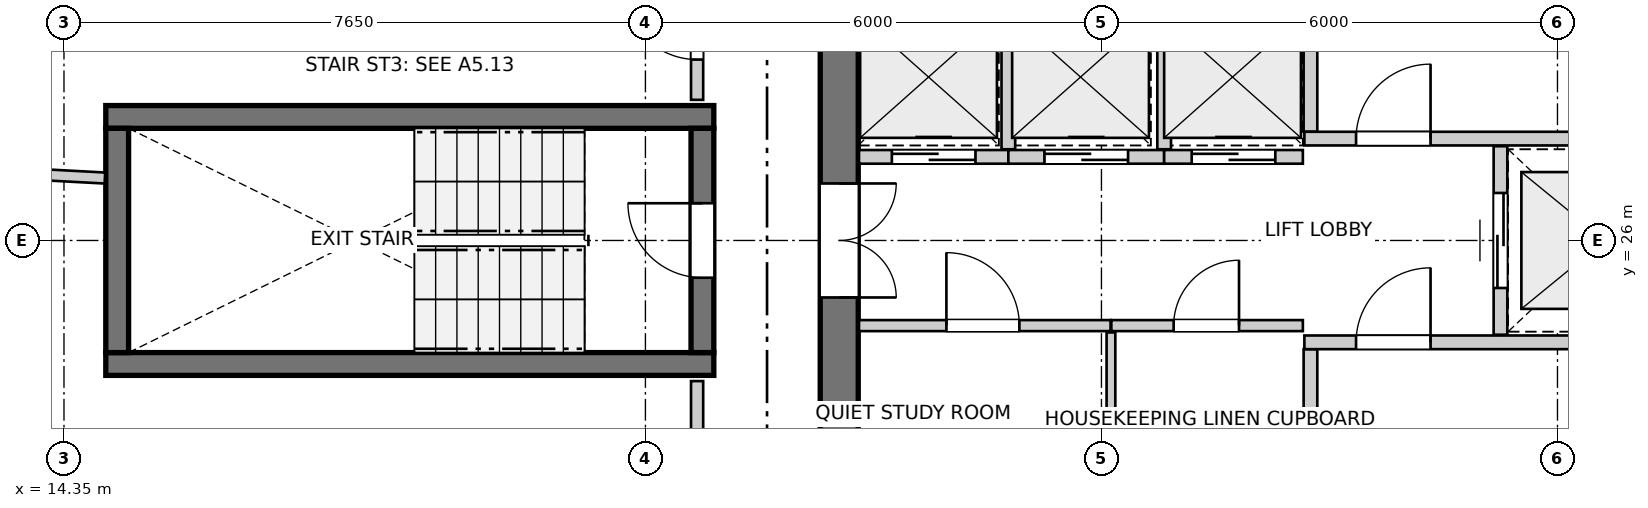
"""IFC4 building model, lengths in metres.
Left out: names, types, materials, properties, quantities, classifications, styles, units other than length and angle.
Written with IfcOpenShell. Run it as: python <this file> out.ifc"""

import sys

from ifc_helpers import new_model, si_unit, direction, frame, frame_2d, origin, place, context, subcontext, project, spatial, rectangle, extrude, source, transform, mapped, element, fill, save


model = new_model("IFC4")
c1 = context("Model", 3, precision=1e-05, world=origin(), true_north=direction((0.0, 1.0)))
c2 = subcontext(c1, "Body", "Model", "MODEL_VIEW")
j1 = project(units=[si_unit("LENGTHUNIT", "METRE"), si_unit("PLANEANGLEUNIT", "RADIAN")], contexts=[c1])
p1 = place(None, origin())
s1 = spatial("IfcSite", under=j1, at=p1, CompositionType="ELEMENT")
p2 = place(p1, origin())
s2 = spatial("IfcBuilding", under=s1, at=p2, CompositionType="ELEMENT")
p3 = place(p2, frame((0.0, 0.0, 211.6)))
s3 = spatial("IfcBuildingStorey", under=s2, at=p3, CompositionType="ELEMENT", Elevation=211.6)
p4 = place(p3, frame((24.55, 33.8, 0.0), z_axis=(0.0, 0.0, 1.0), x_axis=(0.0, -1.0, 0.0)))
e1 = element("IfcWall", 1, at=p4, inside=s3, PredefinedType="SHEAR", context=c2, shape_type="SweptSolid", body=[
    extrude(rectangle(XDim=15.6, YDim=0.5, at=frame_2d((7.8, 0.0))), origin(), (0.0, 0.0, 1.0), 2.96),
])
p5 = place(p4, frame((7.05, 0.0, 0.0)))
e2 = element("IfcOpeningElement", 2, at=p5, cuts=e1, PredefinedType="OPENING", context=c2, shape_type="SweptSolid", body=[
    extrude(rectangle(XDim=1.5, YDim=2.15, at=frame_2d((0.75, 1.075))), frame((0.0, 0.26, 0.0), z_axis=(0.0, -1.0, 0.0), x_axis=(1.0, 0.0, 0.0)), (0.0, 0.0, 1.0), 0.52),
])
p6 = place(p4, frame((3.52, 0.0, 0.0)))
e3 = element("IfcOpeningElement", 3, at=p6, cuts=e1, PredefinedType="OPENING", context=c2, shape_type="SweptSolid", body=[
    extrude(rectangle(XDim=0.86, YDim=2.05, at=frame_2d((0.43, 1.025))), frame((0.0, 0.26, 0.0), z_axis=(0.0, -1.0, 0.0), x_axis=(1.0, 0.0, 0.0)), (0.0, 0.0, 1.0), 0.52),
])
p7 = place(p4, frame((11.22, 0.0, 0.0)))
e4 = element("IfcOpeningElement", 4, at=p7, cuts=e1, PredefinedType="OPENING", context=c2, shape_type="SweptSolid", body=[
    extrude(rectangle(XDim=0.86, YDim=2.05, at=frame_2d((0.43, 1.025))), frame((0.0, 0.26, 0.0), z_axis=(0.0, -1.0, 0.0), x_axis=(1.0, 0.0, 0.0)), (0.0, 0.0, 1.0), 0.52),
])
for number, where, z_axis, x_axis in (
    (5, (14.9, 24.375, 0.0), (0.0, 0.0, 1.0), (1.0, 0.0, 0.0)),
    (6, (22.9, 27.625, 0.0), (0.0, 0.0, 1.0), (-1.0, 0.0, 0.0)),
):
    element("IfcWall", number, at=place(p3, frame(where, z_axis=z_axis, x_axis=x_axis)), inside=s3, PredefinedType="SHEAR", context=c2, shape_type="SweptSolid", body=[
        extrude(rectangle(XDim=8.0, YDim=0.3, at=frame_2d((4.0, 0.0))), origin(), (0.0, 0.0, 1.0), 2.96),
    ])
p8 = place(p3, frame((15.05, 27.475, 0.0), z_axis=(0.0, 0.0, 1.0), x_axis=(0.0, -1.0, 0.0)))
e7 = element("IfcWall", 7, at=p8, inside=s3, PredefinedType="SHEAR", context=c2, shape_type="SweptSolid", body=[
    extrude(rectangle(XDim=2.95, YDim=0.3, at=frame_2d((1.475, 0.0))), origin(), (0.0, 0.0, 1.0), 2.96),
])
p9 = place(p3, frame((22.75, 24.525, 0.0), z_axis=(0.0, 0.0, 1.0), x_axis=(0.0, 1.0, 0.0)))
e8 = element("IfcWall", 8, at=p9, inside=s3, PredefinedType="SHEAR", context=c2, shape_type="SweptSolid", body=[
    extrude(rectangle(XDim=2.95, YDim=0.3, at=frame_2d((1.475, 0.0))), origin(), (0.0, 0.0, 1.0), 2.96),
])
p10 = place(p9, frame((0.985, 0.0, 0.0)))
e9 = element("IfcOpeningElement", 9, at=p10, cuts=e8, PredefinedType="OPENING", context=c2, shape_type="SweptSolid", body=[
    extrude(rectangle(XDim=0.98, YDim=2.15, at=frame_2d((0.49, 1.075))), frame((0.0, 0.16, 0.0), z_axis=(0.0, -1.0, 0.0), x_axis=(1.0, 0.0, 0.0)), (0.0, 0.0, 1.0), 0.32),
])
p11 = place(p3, frame((30.75, 21.46, 0.0), z_axis=(0.0, 0.0, 1.0), x_axis=(0.0, 1.0, 0.0)))
e10 = element("IfcWall", 10, at=p11, inside=s3, PredefinedType="PARTITIONING", context=c2, shape_type="SweptSolid", body=[
    extrude(rectangle(XDim=3.11, YDim=0.18, at=frame_2d((1.555, 0.0))), origin(), (0.0, 0.0, 1.0), 2.96),
])
p12 = place(p11, frame((0.26, 0.0, 0.0)))
e11 = element("IfcOpeningElement", 11, at=p12, cuts=e10, PredefinedType="OPENING", context=c2, shape_type="SweptSolid", body=[
    extrude(rectangle(XDim=0.86, YDim=2.05, at=frame_2d((0.43, 1.025))), frame((0.0, 0.1, 0.0), z_axis=(0.0, -1.0, 0.0), x_axis=(1.0, 0.0, 0.0)), (0.0, 0.0, 1.0), 0.2),
])
p13 = place(p3, frame((30.67, 24.66, 0.0), z_axis=(0.0, 0.0, 1.0), x_axis=(1.0, 0.0, 0.0)))
e12 = element("IfcWall", 12, at=p13, inside=s3, PredefinedType="PARTITIONING", context=c2, shape_type="SweptSolid", body=[
    extrude(rectangle(XDim=5.22, YDim=0.18, at=frame_2d((2.61, 0.0))), origin(), (0.0, 0.0, 1.0), 2.96),
])
p14 = place(p13, frame((0.68, 0.0, 0.0)))
e13 = element("IfcOpeningElement", 13, at=p14, cuts=e12, PredefinedType="OPENING", context=c2, shape_type="SweptSolid", body=[
    extrude(rectangle(XDim=0.98, YDim=2.15, at=frame_2d((0.49, 1.075))), frame((0.0, 0.1, 0.0), z_axis=(0.0, -1.0, 0.0), x_axis=(1.0, 0.0, 0.0)), (0.0, 0.0, 1.0), 0.2),
])
p15 = place(p3, frame((30.75, 27.43, 0.0), z_axis=(0.0, 0.0, 1.0), x_axis=(0.0, 1.0, 0.0)))
e14 = element("IfcWall", 14, at=p15, inside=s3, PredefinedType="PARTITIONING", context=c2, shape_type="SweptSolid", body=[
    extrude(rectangle(XDim=3.11, YDim=0.18, at=frame_2d((1.555, 0.0))), origin(), (0.0, 0.0, 1.0), 2.96),
])
p16 = place(p15, frame((1.98, 0.0, 0.0)))
e15 = element("IfcOpeningElement", 15, at=p16, cuts=e14, PredefinedType="OPENING", context=c2, shape_type="SweptSolid", body=[
    extrude(rectangle(XDim=0.86, YDim=2.05, at=frame_2d((0.43, 1.025))), frame((0.0, 0.1, 0.0), z_axis=(0.0, -1.0, 0.0), x_axis=(1.0, 0.0, 0.0)), (0.0, 0.0, 1.0), 0.2),
])
p17 = place(p3, frame((30.67, 27.34, 0.0), z_axis=(0.0, 0.0, 1.0), x_axis=(1.0, 0.0, 0.0)))
e16 = element("IfcWall", 16, at=p17, inside=s3, PredefinedType="PARTITIONING", context=c2, shape_type="SweptSolid", body=[
    extrude(rectangle(XDim=5.22, YDim=0.18, at=frame_2d((2.61, 0.0))), origin(), (0.0, 0.0, 1.0), 2.96),
])
p18 = place(p17, frame((0.68, 0.0, 0.0)))
e17 = element("IfcOpeningElement", 17, at=p18, cuts=e16, PredefinedType="OPENING", context=c2, shape_type="SweptSolid", body=[
    extrude(rectangle(XDim=0.98, YDim=2.15, at=frame_2d((0.49, 1.075))), frame((0.0, 0.1, 0.0), z_axis=(0.0, -1.0, 0.0), x_axis=(1.0, 0.0, 0.0)), (0.0, 0.0, 1.0), 0.2),
])
p19 = place(p3, frame((33.25, 24.76, 0.0), z_axis=(0.0, 0.0, 1.0), x_axis=(0.0, 1.0, 0.0)))
e18 = element("IfcWall", 18, at=p19, inside=s3, PredefinedType="PARTITIONING", context=c2, shape_type="SweptSolid", body=[
    extrude(rectangle(XDim=2.48, YDim=0.18, at=frame_2d((1.24, 0.0))), origin(), (0.0, 0.0, 1.0), 2.96),
])
p20 = place(p19, frame((0.615, 0.0, 0.0)))
e19 = element("IfcOpeningElement", 19, at=p20, cuts=e18, PredefinedType="OPENING", context=c2, shape_type="SweptSolid", body=[
    extrude(rectangle(XDim=1.25, YDim=2.15, at=frame_2d((0.625, 1.075))), frame((0.0, 0.1, 0.0), z_axis=(0.0, -1.0, 0.0), x_axis=(1.0, 0.0, 0.0)), (0.0, 0.0, 1.0), 0.2),
])
p21 = place(p3, frame((24.81, 24.88, 0.0), z_axis=(0.0, 0.0, 1.0), x_axis=(1.0, 0.0, 0.0)))
e20 = element("IfcWall", 20, at=p21, inside=s3, PredefinedType="PARTITIONING", context=c2, shape_type="SweptSolid", body=[
    extrude(rectangle(XDim=3.31, YDim=0.145, at=frame_2d((1.655, 0.0))), origin(), (0.0, 0.0, 1.0), 2.96),
])
p22 = place(p21, frame((1.15, 0.0, 0.0)))
e21 = element("IfcOpeningElement", 21, at=p22, cuts=e20, PredefinedType="OPENING", context=c2, shape_type="SweptSolid", body=[
    extrude(rectangle(XDim=0.96, YDim=2.1, at=frame_2d((0.48, 1.05))), frame((0.0, 0.083, 0.0), z_axis=(0.0, -1.0, 0.0), x_axis=(1.0, 0.0, 0.0)), (0.0, 0.0, 1.0), 0.165),
])
p23 = place(p3, frame((28.13, 24.88, 0.0), z_axis=(0.0, 0.0, 1.0), x_axis=(1.0, 0.0, 0.0)))
e22 = element("IfcWall", 22, at=p23, inside=s3, PredefinedType="PARTITIONING", context=c2, shape_type="SweptSolid", body=[
    extrude(rectangle(XDim=2.52, YDim=0.145, at=frame_2d((1.26, 0.0))), origin(), (0.0, 0.0, 1.0), 2.96),
])
p24 = place(p23, frame((0.82, 0.0, 0.0)))
e23 = element("IfcOpeningElement", 23, at=p24, cuts=e22, PredefinedType="OPENING", context=c2, shape_type="SweptSolid", body=[
    extrude(rectangle(XDim=0.86, YDim=2.05, at=frame_2d((0.43, 1.025))), frame((0.0, 0.083, 0.0), z_axis=(0.0, -1.0, 0.0), x_axis=(1.0, 0.0, 0.0)), (0.0, 0.0, 1.0), 0.165),
])
p25 = place(p3, frame((28.125, 23.02, 0.0), z_axis=(0.0, 0.0, 1.0), x_axis=(0.0, 1.0, 0.0)))
e24 = element("IfcWall", 24, at=p25, inside=s3, PredefinedType="PARTITIONING", context=c2, shape_type="SweptSolid", body=[
    extrude(rectangle(XDim=1.77, YDim=0.115, at=frame_2d((0.885, 0.0))), origin(), (0.0, 0.0, 1.0), 2.96),
])
p26 = place(p3, frame((24.81, 27.1, 0.0), z_axis=(0.0, 0.0, 1.0), x_axis=(1.0, 0.0, 0.0)))
e25 = element("IfcWall", 25, at=p26, inside=s3, PredefinedType="PARTITIONING", context=c2, shape_type="SweptSolid", body=[
    extrude(rectangle(XDim=1.965, YDim=0.18, at=frame_2d((0.982, 0.0))), origin(), (0.0, 0.0, 1.0), 2.96),
])
p27 = place(p26, frame((0.433, 0.0, 0.0)))
e26 = element("IfcOpeningElement", 26, at=p27, cuts=e25, PredefinedType="OPENING", context=c2, shape_type="SweptSolid", body=[
    extrude(rectangle(XDim=1.1, YDim=2.15, at=frame_2d((0.55, 1.075))), frame((0.0, 0.1, 0.0), z_axis=(0.0, -1.0, 0.0), x_axis=(1.0, 0.0, 0.0)), (0.0, 0.0, 1.0), 0.2),
])
p28 = place(p3, frame((26.775, 27.1, 0.0), z_axis=(0.0, 0.0, 1.0), x_axis=(1.0, 0.0, 0.0)))
e27 = element("IfcWall", 27, at=p28, inside=s3, PredefinedType="PARTITIONING", context=c2, shape_type="SweptSolid", body=[
    extrude(rectangle(XDim=2.05, YDim=0.18, at=frame_2d((1.025, 0.0))), origin(), (0.0, 0.0, 1.0), 2.96),
])
p29 = place(p28, frame((0.475, 0.0, 0.0)))
e28 = element("IfcOpeningElement", 28, at=p29, cuts=e27, PredefinedType="OPENING", context=c2, shape_type="SweptSolid", body=[
    extrude(rectangle(XDim=1.1, YDim=2.15, at=frame_2d((0.55, 1.075))), frame((0.0, 0.1, 0.0), z_axis=(0.0, -1.0, 0.0), x_axis=(1.0, 0.0, 0.0)), (0.0, 0.0, 1.0), 0.2),
])
p30 = place(p3, frame((26.775, 27.2, 0.0), z_axis=(0.0, 0.0, 1.0), x_axis=(0.0, 1.0, 0.0)))
e29 = element("IfcWall", 29, at=p30, inside=s3, PredefinedType="PARTITIONING", context=c2, shape_type="SweptSolid", body=[
    extrude(rectangle(XDim=1.78, YDim=0.18, at=frame_2d((0.89, 0.0))), origin(), (0.0, 0.0, 1.0), 2.96),
])
p31 = place(p3, frame((28.825, 27.1, 0.0), z_axis=(0.0, 0.0, 1.0), x_axis=(1.0, 0.0, 0.0)))
e30 = element("IfcWall", 30, at=p31, inside=s3, PredefinedType="PARTITIONING", context=c2, shape_type="SweptSolid", body=[
    extrude(rectangle(XDim=1.825, YDim=0.18, at=frame_2d((0.913, 0.0))), origin(), (0.0, 0.0, 1.0), 2.96),
])
p32 = place(p31, frame((0.363, 0.0, 0.0)))
e31 = element("IfcOpeningElement", 31, at=p32, cuts=e30, PredefinedType="OPENING", context=c2, shape_type="SweptSolid", body=[
    extrude(rectangle(XDim=1.1, YDim=2.15, at=frame_2d((0.55, 1.075))), frame((0.0, 0.1, 0.0), z_axis=(0.0, -1.0, 0.0), x_axis=(1.0, 0.0, 0.0)), (0.0, 0.0, 1.0), 0.2),
])
p33 = place(p3, frame((28.825, 27.2, 0.0), z_axis=(0.0, 0.0, 1.0), x_axis=(0.0, 1.0, 0.0)))
e32 = element("IfcWall", 32, at=p33, inside=s3, PredefinedType="PARTITIONING", context=c2, shape_type="SweptSolid", body=[
    extrude(rectangle(XDim=1.78, YDim=0.18, at=frame_2d((0.89, 0.0))), origin(), (0.0, 0.0, 1.0), 2.96),
])
p34 = place(p3, frame((22.68, 19.52, 0.0), z_axis=(0.0, 0.0, 1.0), x_axis=(0.0, 1.0, 0.0)))
e33 = element("IfcWall", 33, at=p34, inside=s3, PredefinedType="PARTITIONING", context=c2, shape_type="SweptSolid", body=[
    extrude(rectangle(XDim=4.63, YDim=0.16, at=frame_2d((2.315, 0.0))), origin(), (0.0, 0.0, 1.0), 2.96),
])
p35 = place(p34, frame((1.357, 0.0, 0.0)))
e34 = element("IfcOpeningElement", 34, at=p35, cuts=e33, PredefinedType="OPENING", context=c2, shape_type="SweptSolid", body=[
    extrude(rectangle(XDim=1.3, YDim=2.1, at=frame_2d((0.65, 1.05))), frame((0.0, 0.09, 0.0), z_axis=(0.0, -1.0, 0.0), x_axis=(1.0, 0.0, 0.0)), (0.0, 0.0, 1.0), 0.18),
])
p36 = place(p3, frame((22.68, 27.85, 0.0), z_axis=(0.0, 0.0, 1.0), x_axis=(0.0, 1.0, 0.0)))
e35 = element("IfcWall", 35, at=p36, inside=s3, PredefinedType="PARTITIONING", context=c2, shape_type="SweptSolid", body=[
    extrude(rectangle(XDim=1.929, YDim=0.16, at=frame_2d((0.964, 0.0))), origin(), (0.0, 0.0, 1.0), 2.96),
])
p37 = place(p36, frame((0.53, 0.0, 0.0)))
e36 = element("IfcOpeningElement", 36, at=p37, cuts=e35, PredefinedType="OPENING", context=c2, shape_type="SweptSolid", body=[
    extrude(rectangle(XDim=0.96, YDim=2.1, at=frame_2d((0.48, 1.05))), frame((0.0, 0.09, 0.0), z_axis=(0.0, -1.0, 0.0), x_axis=(1.0, 0.0, 0.0)), (0.0, 0.0, 1.0), 0.18),
])
p38 = place(p3, frame((9.433, 27.112, 0.0), z_axis=(0.0, 0.0, 1.0), x_axis=(0.998589537807, -0.053093643525, 0.0)))
e37 = element("IfcWall", 37, at=p38, inside=s3, PredefinedType="PARTITIONING", context=c2, shape_type="SweptSolid", body=[
    extrude(rectangle(XDim=5.463, YDim=0.145, at=frame_2d((2.731, 0.0))), origin(), (0.0, 0.0, 1.0), 2.96),
])
m1 = source(origin(), c2, "Body", "SweptSolid", [
    extrude(rectangle(XDim=0.98, YDim=2.15, at=frame_2d((0.49, 1.075))), frame((0.0, 0.025, 0.0), z_axis=(0.0, -1.0, 0.0), x_axis=(1.0, 0.0, 0.0)), (0.0, 0.0, 1.0), 0.05),
])
p39 = place(p10, origin())
e38 = element("IfcDoor", 38, at=p39, inside=s3, OperationType="SINGLE_SWING_RIGHT", PredefinedType="DOOR", context=c2, shape_type="MappedRepresentation", body=[
    mapped(m1, transform((0.0, 0.0, 0.0), x_axis=(1.0, 0.0, 0.0), y_axis=(0.0, 1.0, 0.0), z_axis=(0.0, 0.0, 1.0), scale=1.0)),
])
fill(e9, e38)
m2 = source(origin(), c2, "Body", "SweptSolid", [
    extrude(rectangle(XDim=1.5, YDim=2.15, at=frame_2d((0.75, 1.075))), frame((0.0, 0.025, 0.0), z_axis=(0.0, -1.0, 0.0), x_axis=(1.0, 0.0, 0.0)), (0.0, 0.0, 1.0), 0.05),
])
p40 = place(p5, origin())
e39 = element("IfcDoor", 39, at=p40, inside=s3, OperationType="DOUBLE_DOOR_SINGLE_SWING", PredefinedType="DOOR", context=c2, shape_type="MappedRepresentation", body=[
    mapped(m2, transform((0.0, 0.0, 0.0), x_axis=(1.0, 0.0, 0.0), y_axis=(0.0, 1.0, 0.0), z_axis=(0.0, 0.0, 1.0), scale=1.0)),
])
fill(e2, e39)
p41 = place(p14, origin())
e40 = element("IfcDoor", 40, at=p41, inside=s3, OperationType="SINGLE_SWING_RIGHT", PredefinedType="DOOR", context=c2, shape_type="MappedRepresentation", body=[
    mapped(m1, transform((0.0, 0.0, 0.0), x_axis=(1.0, 0.0, 0.0), y_axis=(0.0, 1.0, 0.0), z_axis=(0.0, 0.0, 1.0), scale=1.0)),
])
fill(e13, e40)
p42 = place(p18, origin())
e41 = element("IfcDoor", 41, at=p42, inside=s3, OperationType="SINGLE_SWING_RIGHT", PredefinedType="DOOR", context=c2, shape_type="MappedRepresentation", body=[
    mapped(m1, transform((0.0, 0.0, 0.0), x_axis=(1.0, 0.0, 0.0), y_axis=(0.0, 1.0, 0.0), z_axis=(0.0, 0.0, 1.0), scale=1.0)),
])
fill(e17, e41)
m3 = source(origin(), c2, "Body", "SweptSolid", [
    extrude(rectangle(XDim=1.25, YDim=2.15, at=frame_2d((0.625, 1.075))), frame((0.0, 0.025, 0.0), z_axis=(0.0, -1.0, 0.0), x_axis=(1.0, 0.0, 0.0)), (0.0, 0.0, 1.0), 0.05),
])
p43 = place(p20, origin())
e42 = element("IfcDoor", 42, at=p43, inside=s3, OperationType="DOUBLE_DOOR_SLIDING", PredefinedType="DOOR", context=c2, shape_type="MappedRepresentation", body=[
    mapped(m3, transform((0.0, 0.0, 0.0), x_axis=(1.0, 0.0, 0.0), y_axis=(0.0, 1.0, 0.0), z_axis=(0.0, 0.0, 1.0), scale=1.0)),
])
fill(e19, e42)
m4 = source(origin(), c2, "Body", "SweptSolid", [
    extrude(rectangle(XDim=0.96, YDim=2.1, at=frame_2d((0.48, 1.05))), frame((0.0, 0.025, 0.0), z_axis=(0.0, -1.0, 0.0), x_axis=(1.0, 0.0, 0.0)), (0.0, 0.0, 1.0), 0.05),
])
p44 = place(p22, origin())
e43 = element("IfcDoor", 43, at=p44, inside=s3, OperationType="SINGLE_SWING_LEFT", PredefinedType="DOOR", context=c2, shape_type="MappedRepresentation", body=[
    mapped(m4, transform((0.0, 0.0, 0.0), x_axis=(1.0, 0.0, 0.0), y_axis=(0.0, 1.0, 0.0), z_axis=(0.0, 0.0, 1.0), scale=1.0)),
])
fill(e21, e43)
m5 = source(origin(), c2, "Body", "SweptSolid", [
    extrude(rectangle(XDim=0.86, YDim=2.05, at=frame_2d((0.43, 1.025))), frame((0.0, 0.025, 0.0), z_axis=(0.0, -1.0, 0.0), x_axis=(1.0, 0.0, 0.0)), (0.0, 0.0, 1.0), 0.05),
])
p45 = place(p24, origin())
e44 = element("IfcDoor", 44, at=p45, inside=s3, OperationType="SINGLE_SWING_RIGHT", PredefinedType="DOOR", context=c2, shape_type="MappedRepresentation", body=[
    mapped(m5, transform((0.0, 0.0, 0.0), x_axis=(1.0, 0.0, 0.0), y_axis=(0.0, 1.0, 0.0), z_axis=(0.0, 0.0, 1.0), scale=1.0)),
])
fill(e23, e44)
m6 = source(origin(), c2, "Body", "SweptSolid", [
    extrude(rectangle(XDim=1.1, YDim=2.15, at=frame_2d((0.55, 1.075))), frame((0.0, 0.025, 0.0), z_axis=(0.0, -1.0, 0.0), x_axis=(1.0, 0.0, 0.0)), (0.0, 0.0, 1.0), 0.05),
])
p46 = place(p27, origin())
e45 = element("IfcDoor", 45, at=p46, inside=s3, OperationType="DOUBLE_DOOR_SLIDING", PredefinedType="DOOR", context=c2, shape_type="MappedRepresentation", body=[
    mapped(m6, transform((0.0, 0.0, 0.0), x_axis=(1.0, 0.0, 0.0), y_axis=(0.0, 1.0, 0.0), z_axis=(0.0, 0.0, 1.0), scale=1.0)),
])
fill(e26, e45)
p47 = place(p29, origin())
e46 = element("IfcDoor", 46, at=p47, inside=s3, OperationType="DOUBLE_DOOR_SLIDING", PredefinedType="DOOR", context=c2, shape_type="MappedRepresentation", body=[
    mapped(m6, transform((0.0, 0.0, 0.0), x_axis=(1.0, 0.0, 0.0), y_axis=(0.0, 1.0, 0.0), z_axis=(0.0, 0.0, 1.0), scale=1.0)),
])
fill(e28, e46)
p48 = place(p32, origin())
e47 = element("IfcDoor", 47, at=p48, inside=s3, OperationType="DOUBLE_DOOR_SLIDING", PredefinedType="DOOR", context=c2, shape_type="MappedRepresentation", body=[
    mapped(m6, transform((0.0, 0.0, 0.0), x_axis=(1.0, 0.0, 0.0), y_axis=(0.0, 1.0, 0.0), z_axis=(0.0, 0.0, 1.0), scale=1.0)),
])
fill(e31, e47)
p49 = place(p37, origin())
e48 = element("IfcDoor", 48, at=p49, inside=s3, OperationType="SINGLE_SWING_RIGHT", PredefinedType="DOOR", context=c2, shape_type="MappedRepresentation", body=[
    mapped(m4, transform((0.0, 0.0, 0.0), x_axis=(1.0, 0.0, 0.0), y_axis=(0.0, 1.0, 0.0), z_axis=(0.0, 0.0, 1.0), scale=1.0)),
])
fill(e36, e48)
save(model, sys.argv[1])
